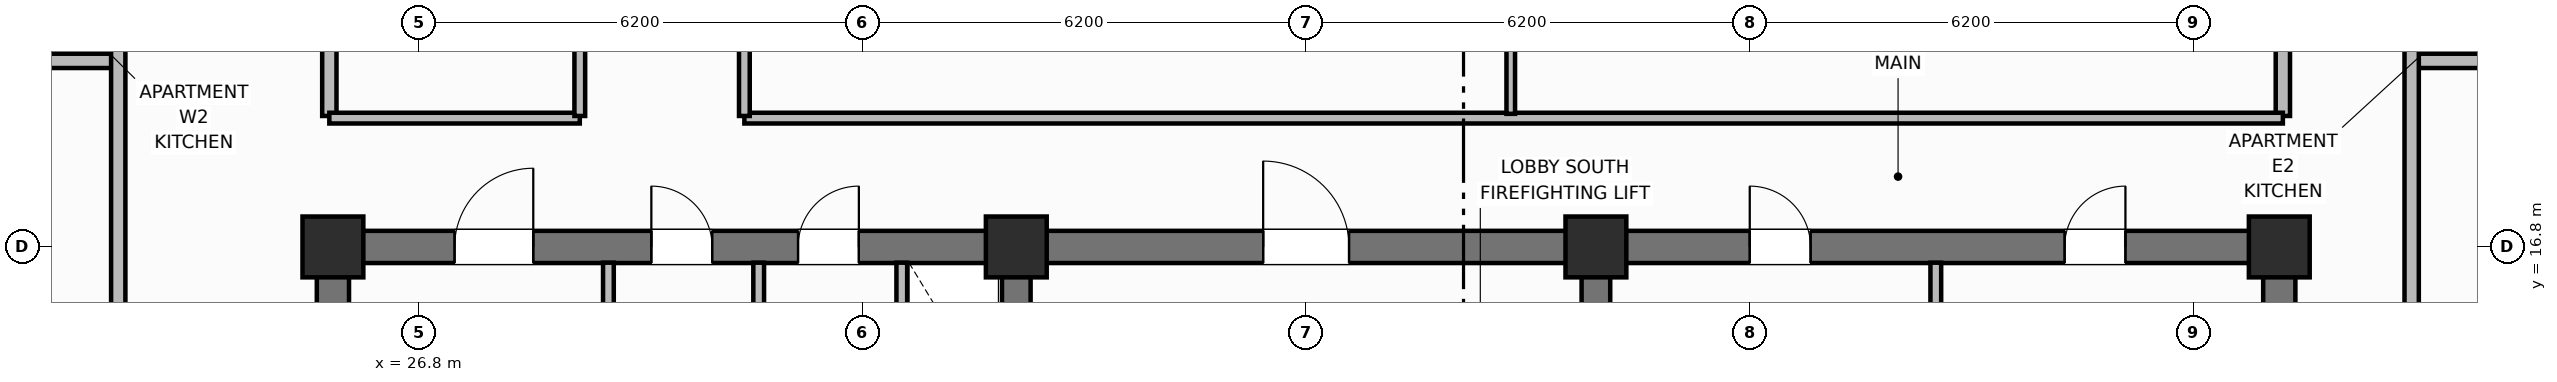
"""IFC4 building model, lengths in metres.
Left out: names, types, materials, properties, quantities, classifications, styles, units other than length and angle.
Written with IfcOpenShell. Run it as: python <this file> out.ifc"""

import sys

from ifc_helpers import new_model, si_unit, direction, frame, frame_2d, origin, origin_2d, place, context, subcontext, project, spatial, rectangle, extrude, element, fill, save


model = new_model("IFC4")
c1 = context("Model", 3, precision=1e-05, world=origin(), true_north=direction((0.0, 1.0)))
c2 = subcontext(c1, "Body", "Model", "MODEL_VIEW")
j1 = project(units=[si_unit("LENGTHUNIT", "METRE"), si_unit("PLANEANGLEUNIT", "RADIAN")], contexts=[c1])
p1 = place(None, origin())
s1 = spatial("IfcSite", under=j1, at=p1, CompositionType="ELEMENT")
p2 = place(p1, origin())
s2 = spatial("IfcBuilding", under=s1, at=p2, CompositionType="ELEMENT")
p3 = place(p2, frame((0.0, 0.0, 222.1)))
s3 = spatial("IfcBuildingStorey", under=s2, at=p3, CompositionType="ELEMENT", Elevation=222.1)
for number, where, z_axis, x_axis in (
    (1, (25.6, 10.825, 0.0), (0.0, 0.0, 1.0), (0.0, 1.0, 0.0)),
    (2, (52.8, 10.825, 0.0), (0.0, 0.0, 1.0), (0.0, 1.0, 0.0)),
):
    element("IfcWall", number, at=place(p3, frame(where, z_axis=z_axis, x_axis=x_axis)), inside=s3, PredefinedType="SHEAR", context=c2, shape_type="SweptSolid", body=[
        extrude(rectangle(XDim=5.75, YDim=0.45, at=frame_2d((2.875, 0.0))), origin(), (0.0, 0.0, 1.0), 3.7),
    ])
p4 = place(p3, frame((25.6, 16.8, 0.0), z_axis=(0.0, 0.0, 1.0), x_axis=(1.0, 0.0, 0.0)))
e3 = element("IfcWall", 3, at=p4, inside=s3, PredefinedType="SHEAR", context=c2, shape_type="SweptSolid", body=[
    extrude(rectangle(XDim=27.2, YDim=0.45, at=frame_2d((13.6, 0.0))), origin(), (0.0, 0.0, 1.0), 3.7),
])
p5 = place(p4, frame((1.7, 0.0, 0.0)))
e4 = element("IfcOpeningElement", 4, at=p5, cuts=e3, PredefinedType="OPENING", context=c2, shape_type="SweptSolid", body=[
    extrude(rectangle(XDim=1.1, YDim=2.15, at=frame_2d((0.55, 1.075))), frame((0.0, 0.235, 0.0), z_axis=(0.0, -1.0, 0.0), x_axis=(1.0, 0.0, 0.0)), (0.0, 0.0, 1.0), 0.47),
])
p6 = place(p4, frame((4.45, 0.0, 0.0)))
e5 = element("IfcOpeningElement", 5, at=p6, cuts=e3, PredefinedType="OPENING", context=c2, shape_type="SweptSolid", body=[
    extrude(rectangle(XDim=0.85, YDim=2.1, at=frame_2d((0.425, 1.05))), frame((0.0, 0.235, 0.0), z_axis=(0.0, -1.0, 0.0), x_axis=(1.0, 0.0, 0.0)), (0.0, 0.0, 1.0), 0.47),
])
p7 = place(p4, frame((6.5, 0.0, 0.0)))
e6 = element("IfcOpeningElement", 6, at=p7, cuts=e3, PredefinedType="OPENING", context=c2, shape_type="SweptSolid", body=[
    extrude(rectangle(XDim=0.85, YDim=2.1, at=frame_2d((0.425, 1.05))), frame((0.0, 0.235, 0.0), z_axis=(0.0, -1.0, 0.0), x_axis=(1.0, 0.0, 0.0)), (0.0, 0.0, 1.0), 0.47),
])
p8 = place(p4, frame((13.0, 0.0, 0.0)))
e7 = element("IfcOpeningElement", 7, at=p8, cuts=e3, PredefinedType="OPENING", context=c2, shape_type="SweptSolid", body=[
    extrude(rectangle(XDim=1.2, YDim=2.15, at=frame_2d((0.6, 1.075))), frame((0.0, 0.235, 0.0), z_axis=(0.0, -1.0, 0.0), x_axis=(1.0, 0.0, 0.0)), (0.0, 0.0, 1.0), 0.47),
])
p9 = place(p4, frame((19.8, 0.0, 0.0)))
e8 = element("IfcOpeningElement", 8, at=p9, cuts=e3, PredefinedType="OPENING", context=c2, shape_type="SweptSolid", body=[
    extrude(rectangle(XDim=0.85, YDim=2.1, at=frame_2d((0.425, 1.05))), frame((0.0, 0.235, 0.0), z_axis=(0.0, -1.0, 0.0), x_axis=(1.0, 0.0, 0.0)), (0.0, 0.0, 1.0), 0.47),
])
p10 = place(p4, frame((24.2, 0.0, 0.0)))
e9 = element("IfcOpeningElement", 9, at=p10, cuts=e3, PredefinedType="OPENING", context=c2, shape_type="SweptSolid", body=[
    extrude(rectangle(XDim=0.85, YDim=2.1, at=frame_2d((0.425, 1.05))), frame((0.0, 0.235, 0.0), z_axis=(0.0, -1.0, 0.0), x_axis=(1.0, 0.0, 0.0)), (0.0, 0.0, 1.0), 0.47),
])
for number, where, z_axis, x_axis in (
    (10, (35.15, 10.825, 0.0), (0.0, 0.0, 1.0), (0.0, 1.0, 0.0)),
    (11, (43.25, 10.825, 0.0), (0.0, 0.0, 1.0), (0.0, 1.0, 0.0)),
):
    element("IfcWall", number, at=place(p3, frame(where, z_axis=z_axis, x_axis=x_axis)), inside=s3, PredefinedType="SHEAR", context=c2, shape_type="SweptSolid", body=[
        extrude(rectangle(XDim=5.75, YDim=0.4, at=frame_2d((2.875, 0.0))), origin(), (0.0, 0.0, 1.0), 3.7),
    ])
for number, where, z_axis, x_axis in (
    (12, (25.6, 16.8, 0.0), (0.0, 0.0, 1.0), (1.0, 0.0, 0.0)),
    (13, (35.15, 16.8, 0.0), (0.0, 0.0, 1.0), (1.0, 0.0, 0.0)),
    (14, (43.25, 16.8, 0.0), (0.0, 0.0, 1.0), (1.0, 0.0, 0.0)),
    (15, (52.8, 16.8, 0.0), (0.0, 0.0, 1.0), (1.0, 0.0, 0.0)),
):
    element("IfcColumn", number, at=place(p3, frame(where, z_axis=z_axis, x_axis=x_axis)), inside=s3, PredefinedType="COLUMN", context=c2, shape_type="SweptSolid", body=[
        extrude(rectangle(XDim=0.85, YDim=0.85, at=origin_2d()), origin(), (0.0, 0.0, 1.0), 3.7),
    ])
for number, where, z_axis, x_axis in (
    (16, (29.45, 14.5, 0.0), (0.0, 0.0, 1.0), (0.0, 1.0, 0.0)),
    (17, (31.55, 14.5, 0.0), (0.0, 0.0, 1.0), (0.0, 1.0, 0.0)),
):
    element("IfcWall", number, at=place(p3, frame(where, z_axis=z_axis, x_axis=x_axis)), inside=s3, PredefinedType="PARTITIONING", context=c2, shape_type="SweptSolid", body=[
        extrude(rectangle(XDim=2.08, YDim=0.15, at=frame_2d((1.04, 0.0))), origin(), (0.0, 0.0, 1.0), 2.24),
    ])
p11 = place(p3, frame((33.55, 14.5, 0.0), z_axis=(0.0, 0.0, 1.0), x_axis=(0.0, 1.0, 0.0)))
e18 = element("IfcWall", 18, at=p11, inside=s3, PredefinedType="PARTITIONING", context=c2, shape_type="SweptSolid", body=[
    extrude(rectangle(XDim=2.08, YDim=0.15, at=frame_2d((1.04, 0.0))), origin(), (0.0, 0.0, 1.0), 2.24),
])
p12 = place(p11, frame((0.55, 0.0, 0.0)))
e19 = element("IfcOpeningElement", 19, at=p12, cuts=e18, PredefinedType="OPENING", context=c2, shape_type="SweptSolid", body=[
    extrude(rectangle(XDim=0.85, YDim=2.05, at=frame_2d((0.425, 1.025))), frame((0.0, 0.085, 0.0), z_axis=(0.0, -1.0, 0.0), x_axis=(1.0, 0.0, 0.0)), (0.0, 0.0, 1.0), 0.17),
])
p13 = place(p3, frame((48.0, 10.95, 0.0), z_axis=(0.0, 0.0, 1.0), x_axis=(0.0, 1.0, 0.0)))
e20 = element("IfcWall", 20, at=p13, inside=s3, PredefinedType="PARTITIONING", context=c2, shape_type="SweptSolid", body=[
    extrude(rectangle(XDim=5.63, YDim=0.15, at=frame_2d((2.815, 0.0))), origin(), (0.0, 0.0, 1.0), 2.24),
])
for number, where, z_axis, x_axis in (
    (21, (25.55, 18.63, 0.0), (0.0, 0.0, 1.0), (0.0, 1.0, 0.0)),
    (22, (52.85, 18.63, 0.0), (0.0, 0.0, 1.0), (0.0, 1.0, 0.0)),
):
    element("IfcWall", number, at=place(p3, frame(where, z_axis=z_axis, x_axis=x_axis)), inside=s3, PredefinedType="PARTITIONING", context=c2, shape_type="SweptSolid", body=[
        extrude(rectangle(XDim=19.14, YDim=0.2, at=frame_2d((9.57, 0.0))), origin(), (0.0, 0.0, 1.0), 2.24),
    ])
p14 = place(p3, frame((25.55, 18.6, 0.0), z_axis=(0.0, 0.0, 1.0), x_axis=(1.0, 0.0, 0.0)))
e23 = element("IfcWall", 23, at=p14, inside=s3, PredefinedType="PARTITIONING", context=c2, shape_type="SweptSolid", body=[
    extrude(rectangle(XDim=3.5, YDim=0.15, at=frame_2d((1.75, 0.0))), origin(), (0.0, 0.0, 1.0), 2.24),
])
p15 = place(p3, frame((31.35, 18.6, 0.0), z_axis=(0.0, 0.0, 1.0), x_axis=(1.0, 0.0, 0.0)))
e24 = element("IfcWall", 24, at=p15, inside=s3, PredefinedType="PARTITIONING", context=c2, shape_type="SweptSolid", body=[
    extrude(rectangle(XDim=21.5, YDim=0.15, at=frame_2d((10.75, 0.0))), origin(), (0.0, 0.0, 1.0), 2.24),
])
p16 = place(p3, frame((42.06, 18.66, 0.0), z_axis=(0.0, 0.0, 1.0), x_axis=(0.0, 1.0, 0.0)))
e25 = element("IfcWall", 25, at=p16, inside=s3, PredefinedType="PARTITIONING", context=c2, shape_type="SweptSolid", body=[
    extrude(rectangle(XDim=10.648, YDim=0.12, at=frame_2d((5.324, 0.0))), origin(), (0.0, 0.0, 1.0), 2.24),
])
p17 = place(p16, frame((2.0, 0.0, 0.0)))
e26 = element("IfcOpeningElement", 26, at=p17, cuts=e25, PredefinedType="OPENING", context=c2, shape_type="SweptSolid", body=[
    extrude(rectangle(XDim=0.9, YDim=2.1, at=frame_2d((0.45, 1.05))), frame((0.0, 0.07, 0.0), z_axis=(0.0, -1.0, 0.0), x_axis=(1.0, 0.0, 0.0)), (0.0, 0.0, 1.0), 0.14),
])
p18 = place(p3, frame((29.05, 18.63, 0.0), z_axis=(0.0, 0.0, 1.0), x_axis=(0.0, 1.0, 0.0)))
e27 = element("IfcWall", 27, at=p18, inside=s3, PredefinedType="PARTITIONING", context=c2, shape_type="SweptSolid", body=[
    extrude(rectangle(XDim=19.14, YDim=0.15, at=frame_2d((9.57, 0.0))), origin(), (0.0, 0.0, 1.0), 2.24),
])
p19 = place(p18, frame((5.5, 0.0, 0.0)))
e28 = element("IfcOpeningElement", 28, at=p19, cuts=e27, PredefinedType="OPENING", context=c2, shape_type="SweptSolid", body=[
    extrude(rectangle(XDim=1.0, YDim=2.15, at=frame_2d((0.5, 1.075))), frame((0.0, 0.085, 0.0), z_axis=(0.0, -1.0, 0.0), x_axis=(1.0, 0.0, 0.0)), (0.0, 0.0, 1.0), 0.17),
])
p20 = place(p3, frame((31.35, 18.63, 0.0), z_axis=(0.0, 0.0, 1.0), x_axis=(0.0, 1.0, 0.0)))
e29 = element("IfcWall", 29, at=p20, inside=s3, PredefinedType="PARTITIONING", context=c2, shape_type="SweptSolid", body=[
    extrude(rectangle(XDim=19.14, YDim=0.15, at=frame_2d((9.57, 0.0))), origin(), (0.0, 0.0, 1.0), 2.24),
])
p21 = place(p20, frame((2.2, 0.0, 0.0)))
e30 = element("IfcOpeningElement", 30, at=p21, cuts=e29, PredefinedType="OPENING", context=c2, shape_type="SweptSolid", body=[
    extrude(rectangle(XDim=1.0, YDim=2.15, at=frame_2d((0.5, 1.075))), frame((0.0, 0.085, 0.0), z_axis=(0.0, -1.0, 0.0), x_axis=(1.0, 0.0, 0.0)), (0.0, 0.0, 1.0), 0.17),
])
p22 = place(p20, frame((12.719, 0.0, 0.0)))
e31 = element("IfcOpeningElement", 31, at=p22, cuts=e29, PredefinedType="OPENING", context=c2, shape_type="SweptSolid", body=[
    extrude(rectangle(XDim=1.0, YDim=2.15, at=frame_2d((0.5, 1.075))), frame((0.0, 0.085, 0.0), z_axis=(0.0, -1.0, 0.0), x_axis=(1.0, 0.0, 0.0)), (0.0, 0.0, 1.0), 0.17),
])
p23 = place(p3, frame((16.57, 19.4, 0.0), z_axis=(0.0, 0.0, 1.0), x_axis=(1.0, 0.0, 0.0)))
e32 = element("IfcWall", 32, at=p23, inside=s3, PredefinedType="PARTITIONING", context=c2, shape_type="SweptSolid", body=[
    extrude(rectangle(XDim=6.03, YDim=0.2, at=frame_2d((3.015, 0.0))), origin(), (0.0, 0.0, 1.0), 2.24),
])
p24 = place(p3, frame((22.6, 10.6, 0.0), z_axis=(0.0, 0.0, 1.0), x_axis=(0.0, 1.0, 0.0)))
e33 = element("IfcWall", 33, at=p24, inside=s3, PredefinedType="PARTITIONING", context=c2, shape_type="SweptSolid", body=[
    extrude(rectangle(XDim=35.2, YDim=0.2, at=frame_2d((17.6, 0.0))), origin(), (0.0, 0.0, 1.0), 2.24),
])
p25 = place(p24, frame((2.65, 0.0, 0.0)))
e34 = element("IfcOpeningElement", 34, at=p25, cuts=e33, PredefinedType="OPENING", context=c2, shape_type="SweptSolid", body=[
    extrude(rectangle(XDim=1.0, YDim=2.15, at=frame_2d((0.5, 1.075))), frame((0.0, 0.11, 0.0), z_axis=(0.0, -1.0, 0.0), x_axis=(1.0, 0.0, 0.0)), (0.0, 0.0, 1.0), 0.22),
])
p26 = place(p24, frame((10.81, 0.0, 0.0)))
e35 = element("IfcOpeningElement", 35, at=p26, cuts=e33, PredefinedType="OPENING", context=c2, shape_type="SweptSolid", body=[
    extrude(rectangle(XDim=1.0, YDim=2.15, at=frame_2d((0.5, 1.075))), frame((0.0, 0.11, 0.0), z_axis=(0.0, -1.0, 0.0), x_axis=(1.0, 0.0, 0.0)), (0.0, 0.0, 1.0), 0.22),
])
p27 = place(p24, frame((19.54, 0.0, 0.0)))
e36 = element("IfcOpeningElement", 36, at=p27, cuts=e33, PredefinedType="OPENING", context=c2, shape_type="SweptSolid", body=[
    extrude(rectangle(XDim=1.0, YDim=2.15, at=frame_2d((0.5, 1.075))), frame((0.0, 0.11, 0.0), z_axis=(0.0, -1.0, 0.0), x_axis=(1.0, 0.0, 0.0)), (0.0, 0.0, 1.0), 0.22),
])
p28 = place(p24, frame((26.95, 0.0, 0.0)))
e37 = element("IfcOpeningElement", 37, at=p28, cuts=e33, PredefinedType="OPENING", context=c2, shape_type="SweptSolid", body=[
    extrude(rectangle(XDim=1.0, YDim=2.15, at=frame_2d((0.5, 1.075))), frame((0.0, 0.11, 0.0), z_axis=(0.0, -1.0, 0.0), x_axis=(1.0, 0.0, 0.0)), (0.0, 0.0, 1.0), 0.22),
])
p29 = place(p3, frame((54.65, 19.4, 0.0), z_axis=(0.0, 0.0, 1.0), x_axis=(1.0, 0.0, 0.0)))
e38 = element("IfcWall", 38, at=p29, inside=s3, PredefinedType="PARTITIONING", context=c2, shape_type="SweptSolid", body=[
    extrude(rectangle(XDim=7.18, YDim=0.2, at=frame_2d((3.59, 0.0))), origin(), (0.0, 0.0, 1.0), 2.24),
])
p30 = place(p3, frame((54.65, 10.6, 0.0), z_axis=(0.0, 0.0, 1.0), x_axis=(0.0, 1.0, 0.0)))
e39 = element("IfcWall", 39, at=p30, inside=s3, PredefinedType="PARTITIONING", context=c2, shape_type="SweptSolid", body=[
    extrude(rectangle(XDim=35.2, YDim=0.2, at=frame_2d((17.6, 0.0))), origin(), (0.0, 0.0, 1.0), 2.24),
])
p31 = place(p30, frame((2.65, 0.0, 0.0)))
e40 = element("IfcOpeningElement", 40, at=p31, cuts=e39, PredefinedType="OPENING", context=c2, shape_type="SweptSolid", body=[
    extrude(rectangle(XDim=1.0, YDim=2.15, at=frame_2d((0.5, 1.075))), frame((0.0, 0.11, 0.0), z_axis=(0.0, -1.0, 0.0), x_axis=(1.0, 0.0, 0.0)), (0.0, 0.0, 1.0), 0.22),
])
p32 = place(p30, frame((10.81, 0.0, 0.0)))
e41 = element("IfcOpeningElement", 41, at=p32, cuts=e39, PredefinedType="OPENING", context=c2, shape_type="SweptSolid", body=[
    extrude(rectangle(XDim=1.0, YDim=2.15, at=frame_2d((0.5, 1.075))), frame((0.0, 0.11, 0.0), z_axis=(0.0, -1.0, 0.0), x_axis=(1.0, 0.0, 0.0)), (0.0, 0.0, 1.0), 0.22),
])
p33 = place(p30, frame((19.54, 0.0, 0.0)))
e42 = element("IfcOpeningElement", 42, at=p33, cuts=e39, PredefinedType="OPENING", context=c2, shape_type="SweptSolid", body=[
    extrude(rectangle(XDim=1.0, YDim=2.15, at=frame_2d((0.5, 1.075))), frame((0.0, 0.11, 0.0), z_axis=(0.0, -1.0, 0.0), x_axis=(1.0, 0.0, 0.0)), (0.0, 0.0, 1.0), 0.22),
])
p34 = place(p30, frame((26.95, 0.0, 0.0)))
e43 = element("IfcOpeningElement", 43, at=p34, cuts=e39, PredefinedType="OPENING", context=c2, shape_type="SweptSolid", body=[
    extrude(rectangle(XDim=1.0, YDim=2.15, at=frame_2d((0.5, 1.075))), frame((0.0, 0.11, 0.0), z_axis=(0.0, -1.0, 0.0), x_axis=(1.0, 0.0, 0.0)), (0.0, 0.0, 1.0), 0.22),
])
p35 = place(p5, origin())
e44 = element("IfcDoor", 44, at=p35, inside=s3, OperationType="SINGLE_SWING_RIGHT", PredefinedType="DOOR", context=c2, shape_type="SweptSolid", body=[
    extrude(rectangle(XDim=1.1, YDim=2.15, at=frame_2d((0.55, 1.075))), frame((0.0, 0.025, 0.0), z_axis=(0.0, -1.0, 0.0), x_axis=(1.0, 0.0, 0.0)), (0.0, 0.0, 1.0), 0.05),
])
fill(e4, e44)
p36 = place(p6, origin())
e45 = element("IfcDoor", 45, at=p36, inside=s3, OperationType="SINGLE_SWING_LEFT", PredefinedType="DOOR", context=c2, shape_type="SweptSolid", body=[
    extrude(rectangle(XDim=0.85, YDim=2.1, at=frame_2d((0.425, 1.05))), frame((0.0, 0.025, 0.0), z_axis=(0.0, -1.0, 0.0), x_axis=(1.0, 0.0, 0.0)), (0.0, 0.0, 1.0), 0.05),
])
fill(e5, e45)
p37 = place(p7, origin())
e46 = element("IfcDoor", 46, at=p37, inside=s3, OperationType="SINGLE_SWING_RIGHT", PredefinedType="DOOR", context=c2, shape_type="SweptSolid", body=[
    extrude(rectangle(XDim=0.85, YDim=2.1, at=frame_2d((0.425, 1.05))), frame((0.0, 0.025, 0.0), z_axis=(0.0, -1.0, 0.0), x_axis=(1.0, 0.0, 0.0)), (0.0, 0.0, 1.0), 0.05),
])
fill(e6, e46)
p38 = place(p8, origin())
e47 = element("IfcDoor", 47, at=p38, inside=s3, OperationType="SINGLE_SWING_LEFT", PredefinedType="DOOR", context=c2, shape_type="SweptSolid", body=[
    extrude(rectangle(XDim=1.2, YDim=2.15, at=frame_2d((0.6, 1.075))), frame((0.0, 0.025, 0.0), z_axis=(0.0, -1.0, 0.0), x_axis=(1.0, 0.0, 0.0)), (0.0, 0.0, 1.0), 0.05),
])
fill(e7, e47)
p39 = place(p9, origin())
e48 = element("IfcDoor", 48, at=p39, inside=s3, OperationType="SINGLE_SWING_LEFT", PredefinedType="DOOR", context=c2, shape_type="SweptSolid", body=[
    extrude(rectangle(XDim=0.85, YDim=2.1, at=frame_2d((0.425, 1.05))), frame((0.0, 0.025, 0.0), z_axis=(0.0, -1.0, 0.0), x_axis=(1.0, 0.0, 0.0)), (0.0, 0.0, 1.0), 0.05),
])
fill(e8, e48)
p40 = place(p10, origin())
e49 = element("IfcDoor", 49, at=p40, inside=s3, OperationType="SINGLE_SWING_RIGHT", PredefinedType="DOOR", context=c2, shape_type="SweptSolid", body=[
    extrude(rectangle(XDim=0.85, YDim=2.1, at=frame_2d((0.425, 1.05))), frame((0.0, 0.025, 0.0), z_axis=(0.0, -1.0, 0.0), x_axis=(1.0, 0.0, 0.0)), (0.0, 0.0, 1.0), 0.05),
])
fill(e9, e49)
save(model, sys.argv[1])
